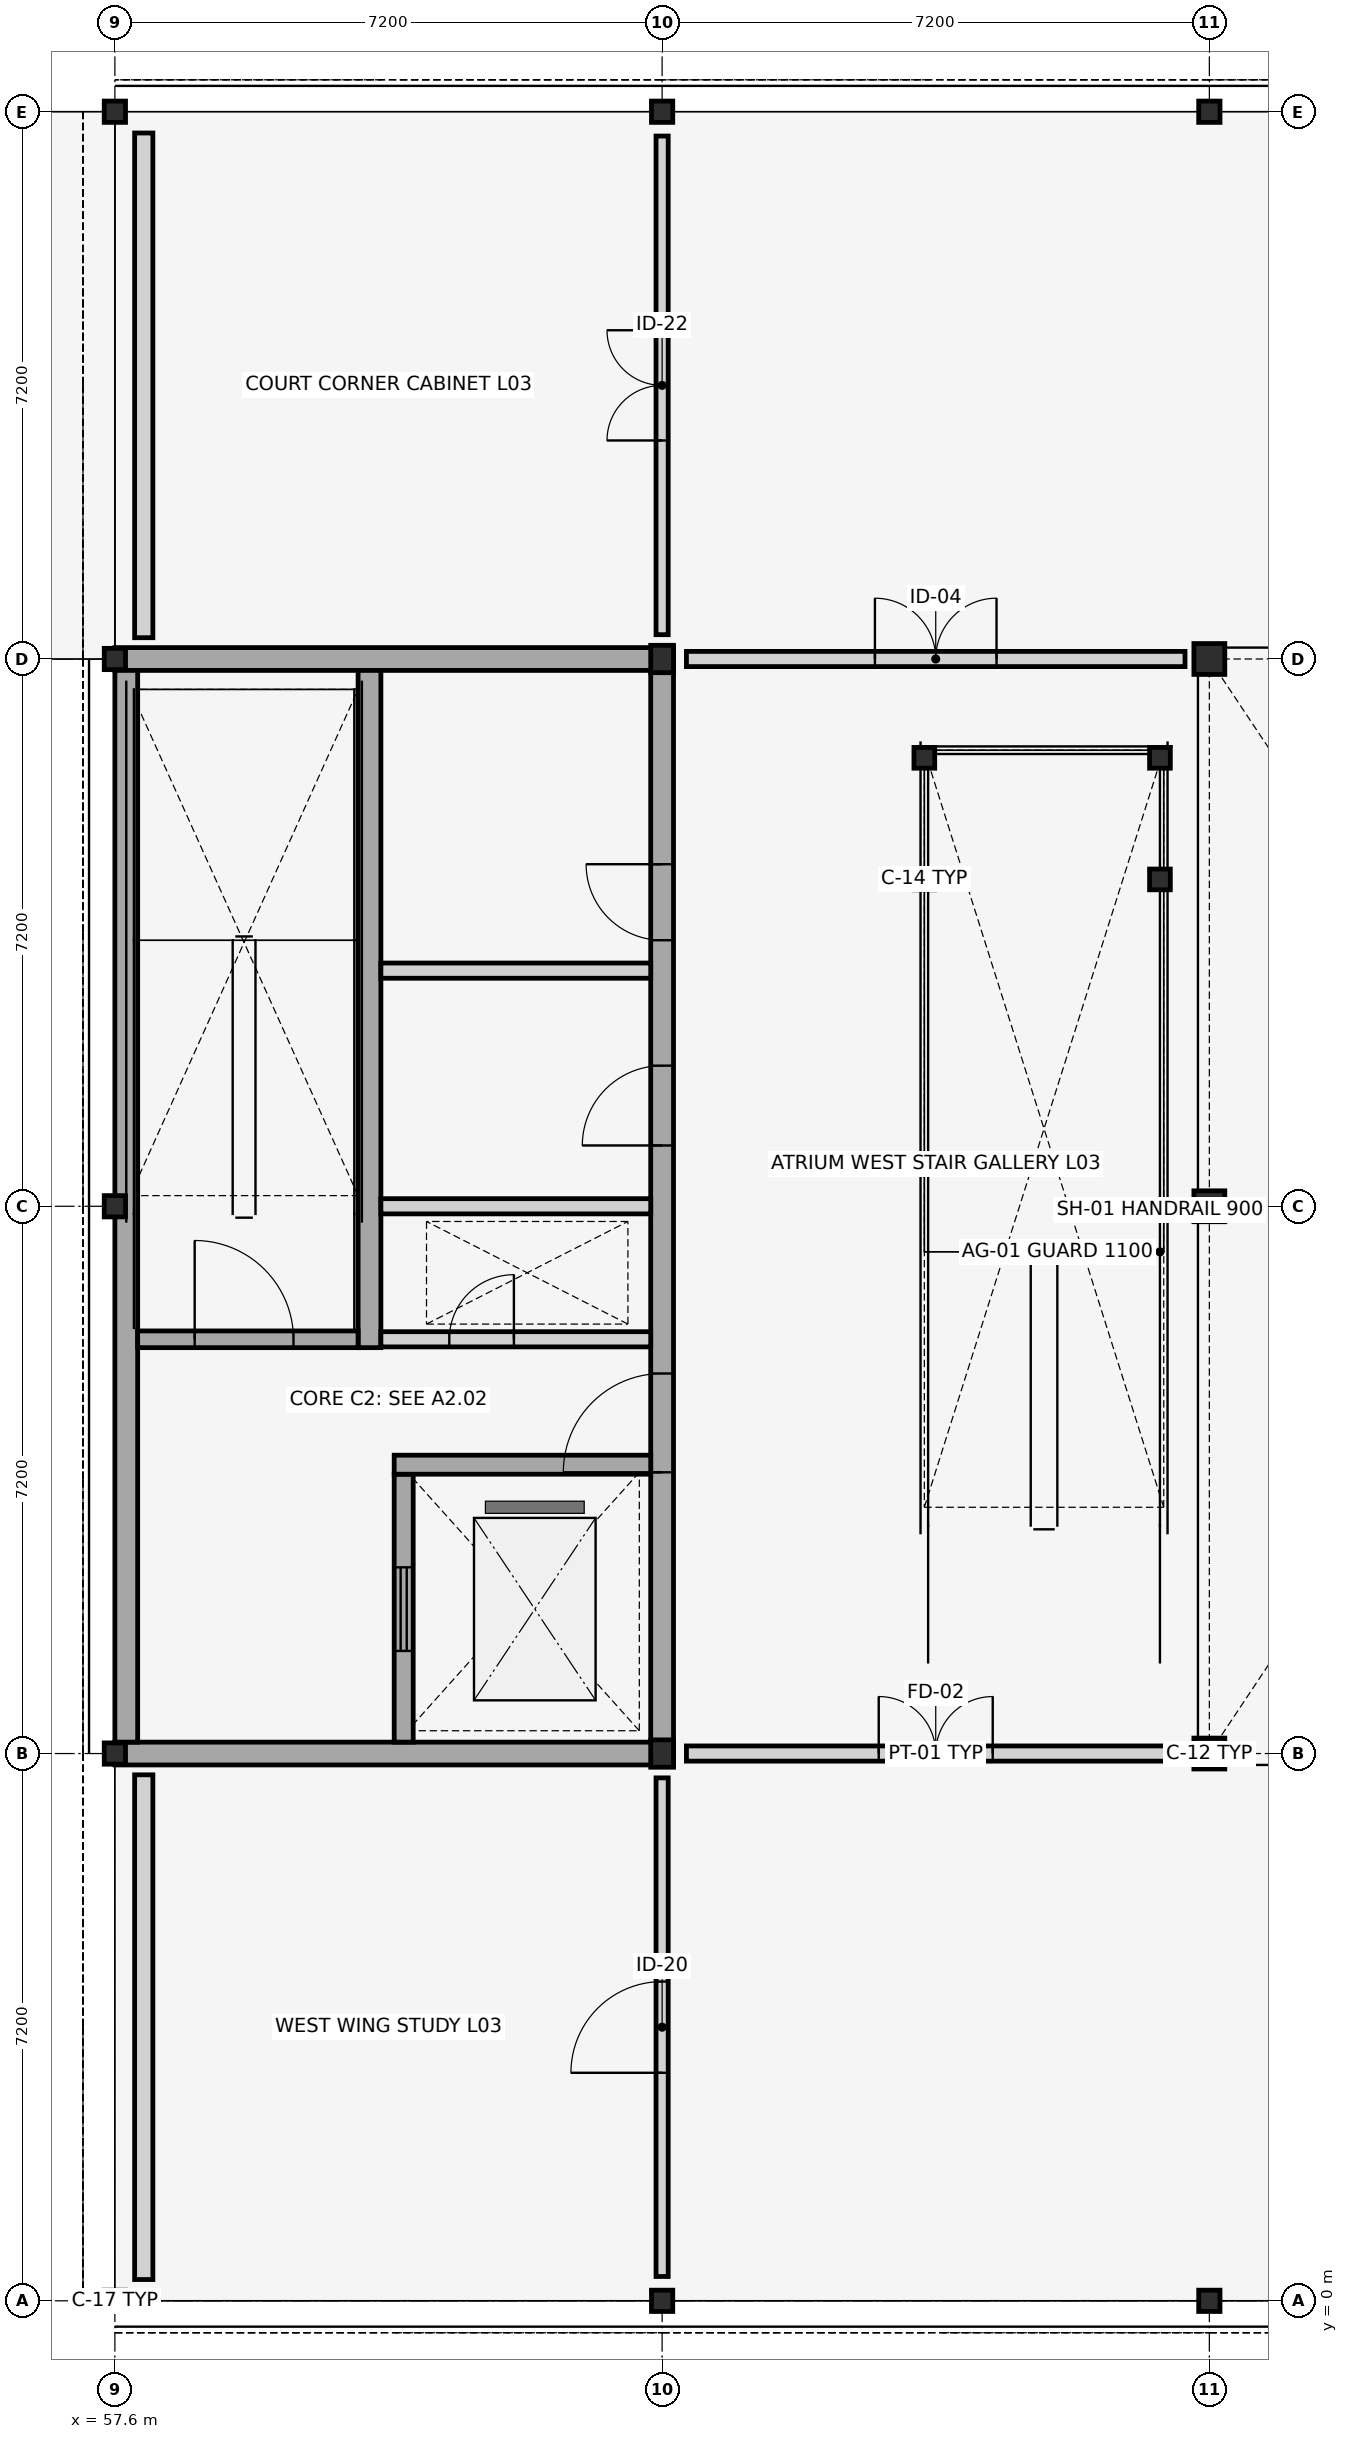
"""IFC4 building model, lengths in metres.
Left out: names, types, materials, properties, quantities, classifications, styles, units other than length and angle.
Written with IfcOpenShell. Run it as: python <this file> out.ifc"""

import sys

from ifc_helpers import new_model, si_unit, direction, frame, frame_2d, origin, origin_2d, place, context, subcontext, project, spatial, rectangle, hollow_circle, i_section, extrude, element, fill, save


model = new_model("IFC4")
c1 = context("Model", 3, precision=1e-05, world=origin(), true_north=direction((0.0, 1.0)))
c2 = subcontext(c1, "Body", "Model", "MODEL_VIEW")
j1 = project(units=[si_unit("LENGTHUNIT", "METRE"), si_unit("PLANEANGLEUNIT", "RADIAN")], contexts=[c1])
p1 = place(None, origin())
s1 = spatial("IfcSite", under=j1, at=p1, CompositionType="ELEMENT")
p2 = place(p1, origin())
s2 = spatial("IfcBuilding", under=s1, at=p2, CompositionType="ELEMENT")
p3 = place(p2, frame((0.0, 0.0, 12.9)))
s3 = spatial("IfcBuildingStorey", under=s2, at=p3, CompositionType="ELEMENT", Elevation=12.9)
for number, where, z_axis, x_axis in (
    (1, (57.6, 0.0, 0.0), (0.0, 0.0, 1.0), (1.0, 0.0, 0.0)),
    (2, (57.6, 7.2, 0.0), (0.0, 0.0, 1.0), (0.0, 1.0, 0.0)),
    (3, (57.6, 14.4, 0.0), (0.0, 0.0, 1.0), (1.0, 0.0, 0.0)),
    (4, (57.6, 21.6, 0.0), (0.0, 0.0, 1.0), (0.0, 1.0, 0.0)),
    (5, (57.6, 28.8, 0.0), (0.0, 0.0, 1.0), (1.0, 0.0, 0.0)),
    (6, (64.8, 0.0, 0.0), (0.0, 0.0, 1.0), (0.0, 1.0, 0.0)),
):
    element("IfcColumn", number, at=place(p3, frame(where, z_axis=z_axis, x_axis=x_axis)), inside=s3, PredefinedType="COLUMN", context=c2, shape_type="SweptSolid", body=[
        extrude(i_section(OverallWidth=0.28, OverallDepth=0.28, WebThickness=0.01, FlangeThickness=0.018, FilletRadius=0.024, at=origin_2d()), origin(), (0.0, 0.0, 1.0), 4.2),
    ])
for number, where, z_axis, x_axis in (
    (7, (64.8, 7.2, 0.0), (0.0, 0.0, 1.0), (1.0, 0.0, 0.0)),
    (8, (64.8, 21.6, 0.0), (0.0, 0.0, 1.0), (1.0, 0.0, 0.0)),
):
    element("IfcColumn", number, at=place(p3, frame(where, z_axis=z_axis, x_axis=x_axis)), inside=s3, PredefinedType="COLUMN", context=c2, shape_type="SweptSolid", body=[
        extrude(i_section(OverallWidth=0.3, OverallDepth=0.36, WebThickness=0.012, FlangeThickness=0.022, FilletRadius=0.027, at=origin_2d()), origin(), (0.0, 0.0, 1.0), 4.2),
    ])
for number, where, z_axis, x_axis in (
    (9, (64.8, 28.8, 0.0), (0.0, 0.0, 1.0), (0.0, 1.0, 0.0)),
    (10, (72.0, 0.0, 0.0), (0.0, 0.0, 1.0), (1.0, 0.0, 0.0)),
):
    element("IfcColumn", number, at=place(p3, frame(where, z_axis=z_axis, x_axis=x_axis)), inside=s3, PredefinedType="COLUMN", context=c2, shape_type="SweptSolid", body=[
        extrude(i_section(OverallWidth=0.28, OverallDepth=0.28, WebThickness=0.01, FlangeThickness=0.018, FilletRadius=0.024, at=origin_2d()), origin(), (0.0, 0.0, 1.0), 4.2),
    ])
for number, where, z_axis, x_axis in (
    (11, (72.0, 7.2, 0.0), (0.0, 0.0, 1.0), (0.0, 1.0, 0.0)),
    (12, (72.0, 14.4, 0.0), (0.0, 0.0, 1.0), (1.0, 0.0, 0.0)),
    (13, (72.0, 21.6, 0.0), (0.0, 0.0, 1.0), (0.0, 1.0, 0.0)),
):
    element("IfcColumn", number, at=place(p3, frame(where, z_axis=z_axis, x_axis=x_axis)), inside=s3, PredefinedType="COLUMN", context=c2, shape_type="SweptSolid", body=[
        extrude(hollow_circle(Radius=0.203, WallThickness=0.016, at=origin_2d()), origin(), (0.0, 0.0, 1.0), 4.2),
    ])
p4 = place(p3, frame((72.0, 28.8, 0.0), z_axis=(0.0, 0.0, 1.0), x_axis=(1.0, 0.0, 0.0)))
e14 = element("IfcColumn", 14, at=p4, inside=s3, PredefinedType="COLUMN", context=c2, shape_type="SweptSolid", body=[
    extrude(i_section(OverallWidth=0.28, OverallDepth=0.28, WebThickness=0.01, FlangeThickness=0.018, FilletRadius=0.024, at=origin_2d()), origin(), (0.0, 0.0, 1.0), 4.2),
])
p5 = place(p3, frame((57.98, 28.52, 0.0), z_axis=(0.0, 0.0, 1.0), x_axis=(0.0, -1.0, 0.0)))
e15 = element("IfcWall", 15, at=p5, inside=s3, PredefinedType="STANDARD", context=c2, shape_type="SweptSolid", body=[
    extrude(rectangle(XDim=6.64, YDim=0.24, at=frame_2d((3.32, 0.0))), origin(), (0.0, 0.0, 1.0), 3.56),
])
p6 = place(p3, frame((57.98, 6.92, 0.0), z_axis=(0.0, 0.0, 1.0), x_axis=(0.0, -1.0, 0.0)))
e16 = element("IfcWall", 16, at=p6, inside=s3, PredefinedType="STANDARD", context=c2, shape_type="SweptSolid", body=[
    extrude(rectangle(XDim=6.64, YDim=0.24, at=frame_2d((3.32, 0.0))), origin(), (0.0, 0.0, 1.0), 3.56),
])
for number, where, z_axis, x_axis in (
    (17, (57.6, 7.2, 0.0), (0.0, 0.0, 1.0), (1.0, 0.0, 0.0)),
    (18, (57.6, 21.6, 0.0), (0.0, 0.0, 1.0), (1.0, 0.0, 0.0)),
):
    element("IfcWall", number, at=place(p3, frame(where, z_axis=z_axis, x_axis=x_axis)), inside=s3, PredefinedType="SHEAR", context=c2, shape_type="SweptSolid", body=[
        extrude(rectangle(XDim=7.35, YDim=0.3, at=frame_2d((3.675, 0.0))), origin(), (0.0, 0.0, 1.0), 3.96),
    ])
p7 = place(p3, frame((57.75, 7.35, 0.0), z_axis=(0.0, 0.0, 1.0), x_axis=(0.0, 1.0, 0.0)))
e19 = element("IfcWall", 19, at=p7, inside=s3, PredefinedType="SHEAR", context=c2, shape_type="SweptSolid", body=[
    extrude(rectangle(XDim=14.1, YDim=0.3, at=frame_2d((7.05, 0.0))), origin(), (0.0, 0.0, 1.0), 3.96),
])
p8 = place(p3, frame((64.8, 7.35, 0.0), z_axis=(0.0, 0.0, 1.0), x_axis=(0.0, 1.0, 0.0)))
e20 = element("IfcWall", 20, at=p8, inside=s3, PredefinedType="SHEAR", context=c2, shape_type="SweptSolid", body=[
    extrude(rectangle(XDim=14.1, YDim=0.3, at=frame_2d((7.05, 0.0))), origin(), (0.0, 0.0, 1.0), 3.96),
])
p9 = place(p8, frame((3.55, 0.0, 0.0)))
e21 = element("IfcOpeningElement", 21, at=p9, cuts=e20, PredefinedType="OPENING", context=c2, shape_type="SweptSolid", body=[
    extrude(rectangle(XDim=1.3, YDim=2.2, at=frame_2d((0.65, 1.1))), frame((0.0, 0.16, 0.0), z_axis=(0.0, -1.0, 0.0), x_axis=(1.0, 0.0, 0.0)), (0.0, 0.0, 1.0), 0.32),
])
p10 = place(p8, frame((7.85, 0.0, 0.0)))
e22 = element("IfcOpeningElement", 22, at=p10, cuts=e20, PredefinedType="OPENING", context=c2, shape_type="SweptSolid", body=[
    extrude(rectangle(XDim=1.05, YDim=2.15, at=frame_2d((0.525, 1.075))), frame((0.0, 0.16, 0.0), z_axis=(0.0, -1.0, 0.0), x_axis=(1.0, 0.0, 0.0)), (0.0, 0.0, 1.0), 0.32),
])
p11 = place(p8, frame((10.55, 0.0, 0.0)))
e23 = element("IfcOpeningElement", 23, at=p11, cuts=e20, PredefinedType="OPENING", context=c2, shape_type="SweptSolid", body=[
    extrude(rectangle(XDim=1.0, YDim=2.15, at=frame_2d((0.5, 1.075))), frame((0.0, 0.16, 0.0), z_axis=(0.0, -1.0, 0.0), x_axis=(1.0, 0.0, 0.0)), (0.0, 0.0, 1.0), 0.32),
])
p12 = place(p3, frame((61.4, 7.35, 0.0), z_axis=(0.0, 0.0, 1.0), x_axis=(0.0, 1.0, 0.0)))
e24 = element("IfcWall", 24, at=p12, inside=s3, PredefinedType="SHEAR", context=c2, shape_type="SweptSolid", body=[
    extrude(rectangle(XDim=3.525, YDim=0.25, at=frame_2d((1.762, 0.0))), origin(), (0.0, 0.0, 1.0), 3.96),
])
p13 = place(p12, frame((1.2, 0.0, 0.0)))
e25 = element("IfcOpeningElement", 25, at=p13, cuts=e24, PredefinedType="OPENING", context=c2, shape_type="SweptSolid", body=[
    extrude(rectangle(XDim=1.1, YDim=2.15, at=frame_2d((0.55, 1.075))), frame((0.0, 0.135, 0.0), z_axis=(0.0, -1.0, 0.0), x_axis=(1.0, 0.0, 0.0)), (0.0, 0.0, 1.0), 0.27),
])
p14 = place(p3, frame((60.95, 12.54, 0.0), z_axis=(0.0, 0.0, 1.0), x_axis=(0.0, 1.0, 0.0)))
e26 = element("IfcWall", 26, at=p14, inside=s3, PredefinedType="SHEAR", context=c2, shape_type="SweptSolid", body=[
    extrude(rectangle(XDim=8.91, YDim=0.3, at=frame_2d((4.455, 0.0))), origin(), (0.0, 0.0, 1.0), 3.96),
])
p15 = place(p3, frame((61.1, 12.65, 0.0), z_axis=(0.0, 0.0, 1.0), x_axis=(1.0, 0.0, 0.0)))
e27 = element("IfcWall", 27, at=p15, inside=s3, PredefinedType="PLUMBINGWALL", context=c2, shape_type="SweptSolid", body=[
    extrude(rectangle(XDim=3.55, YDim=0.2, at=frame_2d((1.775, 0.0))), origin(), (0.0, 0.0, 1.0), 3.38),
])
p16 = place(p15, frame((0.9, 0.0, 0.0)))
e28 = element("IfcOpeningElement", 28, at=p16, cuts=e27, PredefinedType="OPENING", context=c2, shape_type="SweptSolid", body=[
    extrude(rectangle(XDim=0.85, YDim=2.05, at=frame_2d((0.425, 1.025))), frame((0.0, 0.11, 0.0), z_axis=(0.0, -1.0, 0.0), x_axis=(1.0, 0.0, 0.0)), (0.0, 0.0, 1.0), 0.22),
])
p17 = place(p3, frame((57.9, 12.65, 0.0), z_axis=(0.0, 0.0, 1.0), x_axis=(1.0, 0.0, 0.0)))
e29 = element("IfcWall", 29, at=p17, inside=s3, PredefinedType="SHEAR", context=c2, shape_type="SweptSolid", body=[
    extrude(rectangle(XDim=2.9, YDim=0.22, at=frame_2d((1.45, 0.0))), origin(), (0.0, 0.0, 1.0), 3.96),
])
p18 = place(p17, frame((0.75, 0.0, 0.0)))
e30 = element("IfcOpeningElement", 30, at=p18, cuts=e29, PredefinedType="OPENING", context=c2, shape_type="SweptSolid", body=[
    extrude(rectangle(XDim=1.3, YDim=2.2, at=frame_2d((0.65, 1.1))), frame((0.0, 0.12, 0.0), z_axis=(0.0, -1.0, 0.0), x_axis=(1.0, 0.0, 0.0)), (0.0, 0.0, 1.0), 0.24),
])
p19 = place(p3, frame((61.275, 11.0, 0.0), z_axis=(0.0, 0.0, 1.0), x_axis=(1.0, 0.0, 0.0)))
e31 = element("IfcWall", 31, at=p19, inside=s3, PredefinedType="SHEAR", context=c2, shape_type="SweptSolid", body=[
    extrude(rectangle(XDim=3.375, YDim=0.25, at=frame_2d((1.688, 0.0))), origin(), (0.0, 0.0, 1.0), 3.96),
])
for number, where, z_axis, x_axis in (
    (32, (61.1, 14.4, 0.0), (0.0, 0.0, 1.0), (1.0, 0.0, 0.0)),
    (33, (61.1, 17.5, 0.0), (0.0, 0.0, 1.0), (1.0, 0.0, 0.0)),
):
    element("IfcWall", number, at=place(p3, frame(where, z_axis=z_axis, x_axis=x_axis)), inside=s3, PredefinedType="PLUMBINGWALL", context=c2, shape_type="SweptSolid", body=[
        extrude(rectangle(XDim=3.55, YDim=0.2, at=frame_2d((1.775, 0.0))), origin(), (0.0, 0.0, 1.0), 3.38),
    ])
for number, where, z_axis, x_axis in (
    (34, (68.25, 18.7, 0.0), (0.0, 0.0, 1.0), (1.0, 0.0, 0.0)),
    (35, (71.35, 18.7, 0.0), (0.0, 0.0, 1.0), (1.0, 0.0, 0.0)),
    (36, (68.25, 20.3, 0.0), (0.0, 0.0, 1.0), (1.0, 0.0, 0.0)),
    (37, (71.35, 20.3, 0.0), (0.0, 0.0, 1.0), (1.0, 0.0, 0.0)),
):
    element("IfcColumn", number, at=place(p3, frame(where, z_axis=z_axis, x_axis=x_axis)), inside=s3, PredefinedType="COLUMN", context=c2, shape_type="SweptSolid", body=[
        extrude(hollow_circle(Radius=0.136, WallThickness=0.012, at=origin_2d()), origin(), (0.0, 0.0, 1.0), 4.2),
    ])
p20 = place(p3, frame((65.12, 7.2, 0.0), z_axis=(0.0, 0.0, 1.0), x_axis=(1.0, 0.0, 0.0)))
e38 = element("IfcWall", 38, at=p20, inside=s3, PredefinedType="PARTITIONING", context=c2, shape_type="SweptSolid", body=[
    extrude(rectangle(XDim=6.56, YDim=0.2, at=frame_2d((3.28, 0.0))), origin(), (0.0, 0.0, 1.0), 3.15),
])
p21 = place(p20, frame((2.53, 0.0, 0.0)))
e39 = element("IfcOpeningElement", 39, at=p21, cuts=e38, PredefinedType="OPENING", context=c2, shape_type="SweptSolid", body=[
    extrude(rectangle(XDim=1.5, YDim=2.25, at=frame_2d((0.75, 1.125))), frame((0.0, 0.11, 0.0), z_axis=(0.0, -1.0, 0.0), x_axis=(1.0, 0.0, 0.0)), (0.0, 0.0, 1.0), 0.22),
])
p22 = place(p3, frame((65.12, 21.6, 0.0), z_axis=(0.0, 0.0, 1.0), x_axis=(1.0, 0.0, 0.0)))
e40 = element("IfcWall", 40, at=p22, inside=s3, PredefinedType="PARTITIONING", context=c2, shape_type="SweptSolid", body=[
    extrude(rectangle(XDim=6.56, YDim=0.2, at=frame_2d((3.28, 0.0))), origin(), (0.0, 0.0, 1.0), 3.15),
])
p23 = place(p22, frame((2.48, 0.0, 0.0)))
e41 = element("IfcOpeningElement", 41, at=p23, cuts=e40, PredefinedType="OPENING", context=c2, shape_type="SweptSolid", body=[
    extrude(rectangle(XDim=1.6, YDim=2.35, at=frame_2d((0.8, 1.175))), frame((0.0, 0.11, 0.0), z_axis=(0.0, -1.0, 0.0), x_axis=(1.0, 0.0, 0.0)), (0.0, 0.0, 1.0), 0.22),
])
p24 = place(p3, frame((64.8, 0.32, 0.0), z_axis=(0.0, 0.0, 1.0), x_axis=(0.0, 1.0, 0.0)))
e42 = element("IfcWall", 42, at=p24, inside=s3, PredefinedType="PARTITIONING", context=c2, shape_type="SweptSolid", body=[
    extrude(rectangle(XDim=6.56, YDim=0.16, at=frame_2d((3.28, 0.0))), origin(), (0.0, 0.0, 1.0), 3.15),
])
p25 = place(p24, frame((2.68, 0.0, 0.0)))
e43 = element("IfcOpeningElement", 43, at=p25, cuts=e42, PredefinedType="OPENING", context=c2, shape_type="SweptSolid", body=[
    extrude(rectangle(XDim=1.2, YDim=2.4, at=frame_2d((0.6, 1.2))), frame((0.0, 0.09, 0.0), z_axis=(0.0, -1.0, 0.0), x_axis=(1.0, 0.0, 0.0)), (0.0, 0.0, 1.0), 0.18),
])
p26 = place(p3, frame((64.8, 21.92, 0.0), z_axis=(0.0, 0.0, 1.0), x_axis=(0.0, 1.0, 0.0)))
e44 = element("IfcWall", 44, at=p26, inside=s3, PredefinedType="PARTITIONING", context=c2, shape_type="SweptSolid", body=[
    extrude(rectangle(XDim=6.56, YDim=0.16, at=frame_2d((3.28, 0.0))), origin(), (0.0, 0.0, 1.0), 3.15),
])
p27 = place(p26, frame((2.555, 0.0, 0.0)))
e45 = element("IfcOpeningElement", 45, at=p27, cuts=e44, PredefinedType="OPENING", context=c2, shape_type="SweptSolid", body=[
    extrude(rectangle(XDim=1.45, YDim=2.35, at=frame_2d((0.725, 1.175))), frame((0.0, 0.09, 0.0), z_axis=(0.0, -1.0, 0.0), x_axis=(1.0, 0.0, 0.0)), (0.0, 0.0, 1.0), 0.18),
])
p28 = place(p9, origin())
e46 = element("IfcDoor", 46, at=p28, inside=s3, OperationType="SINGLE_SWING_LEFT", PredefinedType="DOOR", context=c2, shape_type="SweptSolid", body=[
    extrude(rectangle(XDim=1.3, YDim=2.2, at=frame_2d((0.65, 1.1))), frame((0.0, 0.025, 0.0), z_axis=(0.0, -1.0, 0.0), x_axis=(1.0, 0.0, 0.0)), (0.0, 0.0, 1.0), 0.05),
])
fill(e21, e46)
p29 = place(p10, origin())
e47 = element("IfcDoor", 47, at=p29, inside=s3, OperationType="SINGLE_SWING_LEFT", PredefinedType="DOOR", context=c2, shape_type="SweptSolid", body=[
    extrude(rectangle(XDim=1.05, YDim=2.15, at=frame_2d((0.525, 1.075))), frame((0.0, 0.025, 0.0), z_axis=(0.0, -1.0, 0.0), x_axis=(1.0, 0.0, 0.0)), (0.0, 0.0, 1.0), 0.05),
])
fill(e22, e47)
p30 = place(p11, origin())
e48 = element("IfcDoor", 48, at=p30, inside=s3, OperationType="SINGLE_SWING_RIGHT", PredefinedType="DOOR", context=c2, shape_type="SweptSolid", body=[
    extrude(rectangle(XDim=1.0, YDim=2.15, at=frame_2d((0.5, 1.075))), frame((0.0, 0.025, 0.0), z_axis=(0.0, -1.0, 0.0), x_axis=(1.0, 0.0, 0.0)), (0.0, 0.0, 1.0), 0.05),
])
fill(e23, e48)
p31 = place(p13, origin())
e49 = element("IfcDoor", 49, at=p31, inside=s3, OperationType="SLIDING_TO_LEFT", PredefinedType="DOOR", context=c2, shape_type="SweptSolid", body=[
    extrude(rectangle(XDim=1.1, YDim=2.15, at=frame_2d((0.55, 1.075))), frame((0.0, 0.025, 0.0), z_axis=(0.0, -1.0, 0.0), x_axis=(1.0, 0.0, 0.0)), (0.0, 0.0, 1.0), 0.05),
])
fill(e25, e49)
p32 = place(p16, origin())
e50 = element("IfcDoor", 50, at=p32, inside=s3, OperationType="SINGLE_SWING_RIGHT", PredefinedType="TRAPDOOR", context=c2, shape_type="SweptSolid", body=[
    extrude(rectangle(XDim=0.85, YDim=2.05, at=frame_2d((0.425, 1.025))), frame((0.0, 0.025, 0.0), z_axis=(0.0, -1.0, 0.0), x_axis=(1.0, 0.0, 0.0)), (0.0, 0.0, 1.0), 0.05),
])
fill(e28, e50)
p33 = place(p18, origin())
e51 = element("IfcDoor", 51, at=p33, inside=s3, OperationType="SINGLE_SWING_LEFT", PredefinedType="DOOR", context=c2, shape_type="SweptSolid", body=[
    extrude(rectangle(XDim=1.3, YDim=2.2, at=frame_2d((0.65, 1.1))), frame((0.0, 0.025, 0.0), z_axis=(0.0, -1.0, 0.0), x_axis=(1.0, 0.0, 0.0)), (0.0, 0.0, 1.0), 0.05),
])
fill(e30, e51)
p34 = place(p21, origin())
e52 = element("IfcDoor", 52, at=p34, inside=s3, OperationType="DOUBLE_DOOR_SINGLE_SWING", PredefinedType="DOOR", context=c2, shape_type="SweptSolid", body=[
    extrude(rectangle(XDim=1.5, YDim=2.25, at=frame_2d((0.75, 1.125))), frame((0.0, 0.025, 0.0), z_axis=(0.0, -1.0, 0.0), x_axis=(1.0, 0.0, 0.0)), (0.0, 0.0, 1.0), 0.05),
])
fill(e39, e52)
p35 = place(p23, origin())
e53 = element("IfcDoor", 53, at=p35, inside=s3, OperationType="DOUBLE_DOOR_SINGLE_SWING", PredefinedType="DOOR", context=c2, shape_type="SweptSolid", body=[
    extrude(rectangle(XDim=1.6, YDim=2.35, at=frame_2d((0.8, 1.175))), frame((0.0, 0.025, 0.0), z_axis=(0.0, -1.0, 0.0), x_axis=(1.0, 0.0, 0.0)), (0.0, 0.0, 1.0), 0.05),
])
fill(e41, e53)
p36 = place(p25, origin())
e54 = element("IfcDoor", 54, at=p36, inside=s3, OperationType="SINGLE_SWING_LEFT", PredefinedType="DOOR", context=c2, shape_type="SweptSolid", body=[
    extrude(rectangle(XDim=1.2, YDim=2.4, at=frame_2d((0.6, 1.2))), frame((0.0, 0.025, 0.0), z_axis=(0.0, -1.0, 0.0), x_axis=(1.0, 0.0, 0.0)), (0.0, 0.0, 1.0), 0.05),
])
fill(e43, e54)
p37 = place(p27, origin())
e55 = element("IfcDoor", 55, at=p37, inside=s3, OperationType="DOUBLE_DOOR_SINGLE_SWING", PredefinedType="DOOR", context=c2, shape_type="SweptSolid", body=[
    extrude(rectangle(XDim=1.45, YDim=2.35, at=frame_2d((0.725, 1.175))), frame((0.0, 0.025, 0.0), z_axis=(0.0, -1.0, 0.0), x_axis=(1.0, 0.0, 0.0)), (0.0, 0.0, 1.0), 0.05),
])
fill(e45, e55)
save(model, sys.argv[1])
